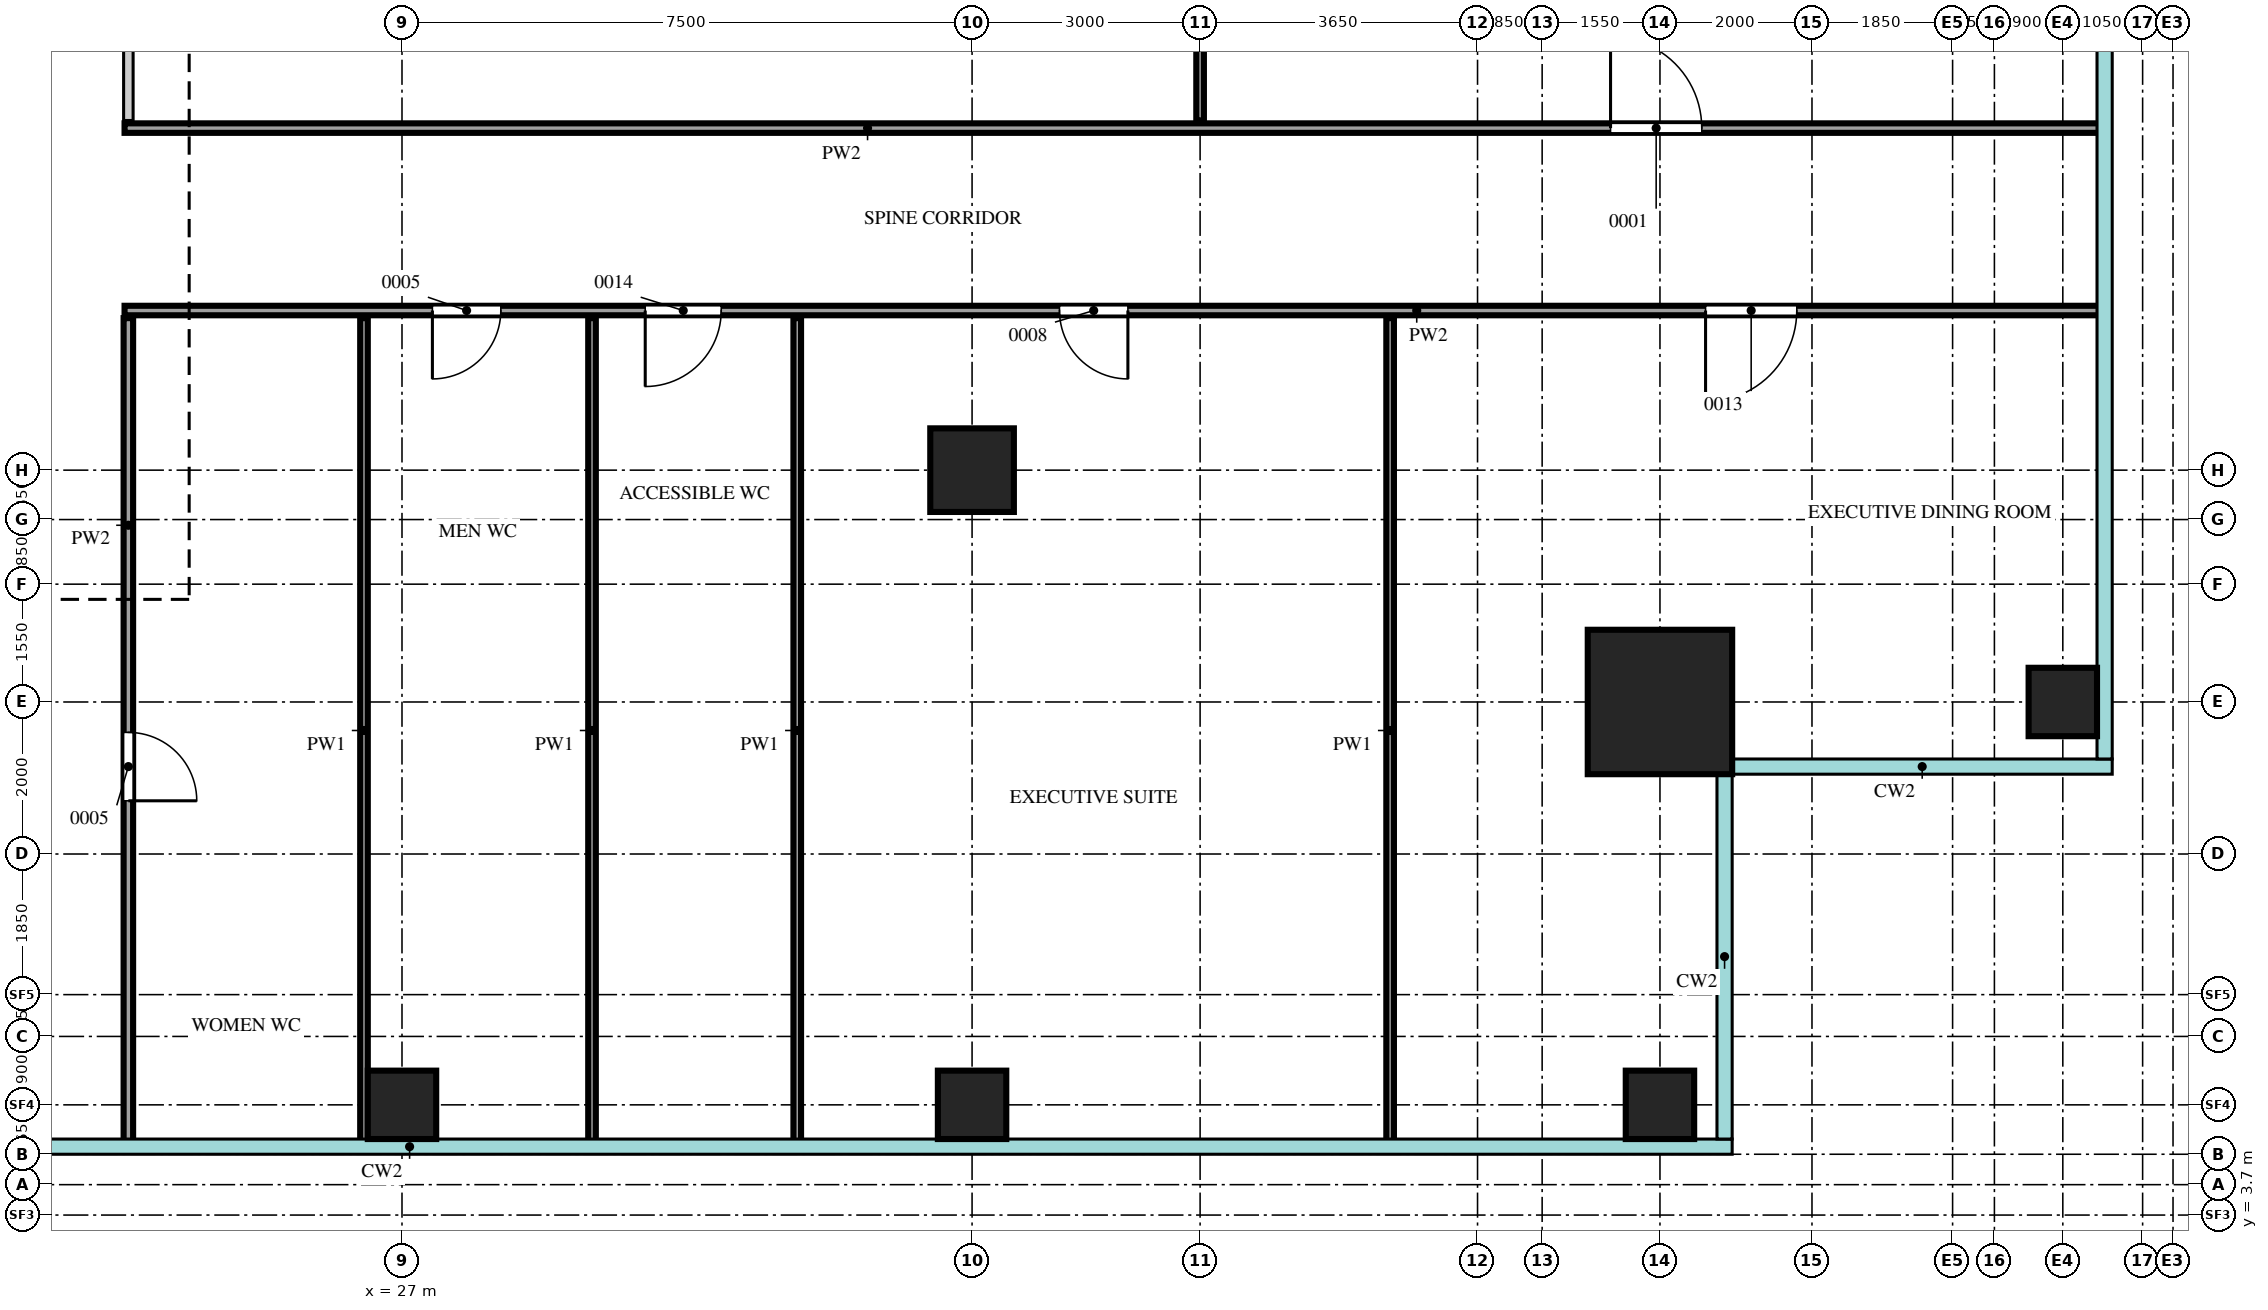
"""IFC4 building model, lengths in metres.
Left out: names, types, materials, properties, quantities, classifications, styles, units other than length and angle.
Written with IfcOpenShell. Run it as: python <this file> out.ifc"""

import sys

from ifc_helpers import new_model, si_unit, direction, frame, frame_2d, origin, origin_2d, place, context, subcontext, project, spatial, rectangle, extrude, source, transform, mapped, element, fill, save


model = new_model("IFC4")
c1 = context("Model", 3, precision=1e-05, world=origin(), true_north=direction((0.0, 1.0)))
c2 = subcontext(c1, "Body", "Model", "MODEL_VIEW")
j1 = project(units=[si_unit("LENGTHUNIT", "METRE"), si_unit("PLANEANGLEUNIT", "RADIAN")], contexts=[c1])
p1 = place(None, origin())
s1 = spatial("IfcSite", under=j1, at=p1, CompositionType="ELEMENT")
p2 = place(p1, origin())
s2 = spatial("IfcBuilding", under=s1, at=p2, CompositionType="ELEMENT")
p3 = place(p2, frame((0.0, 0.0, 270.2)))
s3 = spatial("IfcBuildingStorey", under=s2, at=p3, CompositionType="ELEMENT", Elevation=270.2)
m1 = source(origin(), c2, "Body", "SweptSolid", [
    extrude(rectangle(XDim=1.9, YDim=1.9, at=origin_2d()), origin(), (0.0, 0.0, 1.0), 4.0),
])
p4 = place(p3, frame((43.55, 10.45, 0.0), z_axis=(0.0, 0.0, 1.0), x_axis=(1.0, 0.0, 0.0)))
e1 = element("IfcColumn", 1, at=p4, inside=s3, PredefinedType="COLUMN", context=c2, shape_type="MappedRepresentation", body=[
    mapped(m1, transform((0.0, 0.0, 0.0))),
])
m2 = source(origin(), c2, "Body", "SweptSolid", [
    extrude(rectangle(XDim=0.9, YDim=0.9, at=origin_2d()), origin(), (0.0, 0.0, 1.0), 4.0),
])
for number, where, z_axis, x_axis in (
    (2, (27.0, 5.15, 0.0), (0.0, 0.0, 1.0), (1.0, 0.0, 0.0)),
    (3, (34.5, 5.15, 0.0), (0.0, 0.0, 1.0), (1.0, 0.0, 0.0)),
    (4, (43.55, 5.15, 0.0), (0.0, 0.0, 1.0), (1.0, 0.0, 0.0)),
    (5, (48.85, 10.45, 0.0), (0.0, 0.0, 1.0), (1.0, 0.0, 0.0)),
):
    element("IfcColumn", number, at=place(p3, frame(where, z_axis=z_axis, x_axis=x_axis)), inside=s3, PredefinedType="COLUMN", context=c2, shape_type="MappedRepresentation", body=[
        mapped(m2, transform((0.0, 0.0, 0.0))),
    ])
m3 = source(origin(), c2, "Body", "SweptSolid", [
    extrude(rectangle(XDim=1.1, YDim=1.1, at=origin_2d()), origin(), (0.0, 0.0, 1.0), 4.0),
])
p5 = place(p3, frame((34.5, 13.5, 0.0), z_axis=(0.0, 0.0, 1.0), x_axis=(1.0, 0.0, 0.0)))
e6 = element("IfcColumn", 6, at=p5, inside=s3, PredefinedType="COLUMN", context=c2, shape_type="MappedRepresentation", body=[
    mapped(m3, transform((0.0, 0.0, 0.0))),
])
m4 = source(origin(), c2, "Body", "SweptSolid", [
    extrude(rectangle(XDim=10.85, YDim=0.125, at=frame_2d((5.425, 0.0))), origin(), (0.0, 0.0, 1.0), 3.8),
])
p6 = place(p3, frame((23.4, 4.65, 0.0), z_axis=(0.0, 0.0, 1.0), x_axis=(0.0, 1.0, 0.0)))
e7 = element("IfcWall", 7, at=p6, inside=s3, PredefinedType="PARTITIONING", context=c2, shape_type="MappedRepresentation", body=[
    mapped(m4, transform((0.0, 0.0, 0.0))),
])
m5 = source(origin(), c2, "Body", "SweptSolid", [
    extrude(rectangle(XDim=0.9, YDim=2.1, at=frame_2d((0.45, 1.05))), frame((0.0, 0.073, 0.0), z_axis=(0.0, -1.0, 0.0), x_axis=(1.0, 0.0, 0.0)), (0.0, 0.0, 1.0), 0.145),
])
p7 = place(p6, frame((4.5, 0.0, 0.0)))
e8 = element("IfcOpeningElement", 8, at=p7, cuts=e7, PredefinedType="OPENING", context=c2, shape_type="MappedRepresentation", body=[
    mapped(m5, transform((0.0, 0.0, 0.0))),
])
m6 = source(origin(), c2, "Body", "SweptSolid", [
    extrude(rectangle(XDim=10.85, YDim=0.1, at=frame_2d((5.425, 0.0))), origin(), (0.0, 0.0, 1.0), 3.8),
])
for number, where, z_axis, x_axis in (
    (9, (26.5, 4.65, 0.0), (0.0, 0.0, 1.0), (0.0, 1.0, 0.0)),
    (10, (29.5, 4.65, 0.0), (0.0, 0.0, 1.0), (0.0, 1.0, 0.0)),
    (11, (32.2, 4.65, 0.0), (0.0, 0.0, 1.0), (0.0, 1.0, 0.0)),
    (12, (40.0, 4.65, 0.0), (0.0, 0.0, 1.0), (0.0, 1.0, 0.0)),
):
    element("IfcWall", number, at=place(p3, frame(where, z_axis=z_axis, x_axis=x_axis)), inside=s3, PredefinedType="PARTITIONING", context=c2, shape_type="MappedRepresentation", body=[
        mapped(m6, transform((0.0, 0.0, 0.0))),
    ])
m7 = source(origin(), c2, "Body", "SweptSolid", [
    extrude(rectangle(XDim=26.0, YDim=0.125, at=frame_2d((13.0, 0.0))), origin(), (0.0, 0.0, 1.0), 3.8),
])
p8 = place(p3, frame((23.35, 15.6, 0.0), z_axis=(0.0, 0.0, 1.0), x_axis=(1.0, 0.0, 0.0)))
e13 = element("IfcWall", 13, at=p8, inside=s3, PredefinedType="PARTITIONING", context=c2, shape_type="MappedRepresentation", body=[
    mapped(m7, transform((0.0, 0.0, 0.0))),
])
p9 = place(p8, frame((4.05, 0.0, 0.0)))
e14 = element("IfcOpeningElement", 14, at=p9, cuts=e13, PredefinedType="OPENING", context=c2, shape_type="MappedRepresentation", body=[
    mapped(m5, transform((0.0, 0.0, 0.0))),
])
m8 = source(origin(), c2, "Body", "SweptSolid", [
    extrude(rectangle(XDim=1.0, YDim=2.1, at=frame_2d((0.5, 1.05))), frame((0.0, 0.073, 0.0), z_axis=(0.0, -1.0, 0.0), x_axis=(1.0, 0.0, 0.0)), (0.0, 0.0, 1.0), 0.145),
])
p10 = place(p8, frame((6.85, 0.0, 0.0)))
e15 = element("IfcOpeningElement", 15, at=p10, cuts=e13, PredefinedType="OPENING", context=c2, shape_type="MappedRepresentation", body=[
    mapped(m8, transform((0.0, 0.0, 0.0))),
])
p11 = place(p8, frame((12.3, 0.0, 0.0)))
e16 = element("IfcOpeningElement", 16, at=p11, cuts=e13, PredefinedType="OPENING", context=c2, shape_type="MappedRepresentation", body=[
    mapped(m5, transform((0.0, 0.0, 0.0))),
])
m9 = source(origin(), c2, "Body", "SweptSolid", [
    extrude(rectangle(XDim=1.2, YDim=2.1, at=frame_2d((0.6, 1.05))), frame((0.0, 0.073, 0.0), z_axis=(0.0, -1.0, 0.0), x_axis=(1.0, 0.0, 0.0)), (0.0, 0.0, 1.0), 0.145),
])
p12 = place(p8, frame((20.8, 0.0, 0.0)))
e17 = element("IfcOpeningElement", 17, at=p12, cuts=e13, PredefinedType="OPENING", context=c2, shape_type="MappedRepresentation", body=[
    mapped(m9, transform((0.0, 0.0, 0.0))),
])
p13 = place(p3, frame((23.35, 18.0, 0.0), z_axis=(0.0, 0.0, 1.0), x_axis=(1.0, 0.0, 0.0)))
e18 = element("IfcWall", 18, at=p13, inside=s3, PredefinedType="PARTITIONING", context=c2, shape_type="MappedRepresentation", body=[
    mapped(m7, transform((0.0, 0.0, 0.0))),
])
p14 = place(p13, frame((19.55, 0.0, 0.0)))
e19 = element("IfcOpeningElement", 19, at=p14, cuts=e18, PredefinedType="OPENING", context=c2, shape_type="MappedRepresentation", body=[
    mapped(m9, transform((0.0, 0.0, 0.0))),
])
m10 = source(origin(), c2, "Body", "SweptSolid", [
    extrude(rectangle(XDim=18.4, YDim=0.125, at=frame_2d((9.2, 0.0))), origin(), (0.0, 0.0, 1.0), 3.8),
])
p15 = place(p3, frame((23.4, 18.1, 0.0), z_axis=(0.0, 0.0, 1.0), x_axis=(0.0, 1.0, 0.0)))
e20 = element("IfcWall", 20, at=p15, inside=s3, PredefinedType="PARTITIONING", context=c2, shape_type="MappedRepresentation", body=[
    mapped(m10, transform((0.0, 0.0, 0.0))),
])
p16 = place(p15, frame((8.6, 0.0, 0.0)))
e21 = element("IfcOpeningElement", 21, at=p16, cuts=e20, PredefinedType="OPENING", context=c2, shape_type="MappedRepresentation", body=[
    mapped(m9, transform((0.0, 0.0, 0.0))),
])
m11 = source(origin(), c2, "Body", "SweptSolid", [
    extrude(rectangle(XDim=18.4, YDim=0.1, at=frame_2d((9.2, 0.0))), origin(), (0.0, 0.0, 1.0), 3.8),
])
p17 = place(p3, frame((37.5, 18.1, 0.0), z_axis=(0.0, 0.0, 1.0), x_axis=(0.0, 1.0, 0.0)))
e22 = element("IfcWall", 22, at=p17, inside=s3, PredefinedType="PARTITIONING", context=c2, shape_type="MappedRepresentation", body=[
    mapped(m11, transform((0.0, 0.0, 0.0))),
])
m12 = source(origin(), c2, "Body", "SweptSolid", [
    extrude(rectangle(XDim=0.9, YDim=2.1, at=frame_2d((0.45, 1.05))), frame((0.0, 0.025, 0.0), z_axis=(0.0, -1.0, 0.0), x_axis=(1.0, 0.0, 0.0)), (0.0, 0.0, 1.0), 0.05),
])
p18 = place(p7, origin())
e23 = element("IfcDoor", 23, at=p18, inside=s3, OperationType="SINGLE_SWING_LEFT", PredefinedType="DOOR", context=c2, shape_type="MappedRepresentation", body=[
    mapped(m12, transform((0.0, 0.0, 0.0))),
])
fill(e8, e23)
p19 = place(p9, origin())
e24 = element("IfcDoor", 24, at=p19, inside=s3, OperationType="SINGLE_SWING_LEFT", PredefinedType="DOOR", context=c2, shape_type="MappedRepresentation", body=[
    mapped(m12, transform((0.0, 0.0, 0.0))),
])
fill(e14, e24)
m13 = source(origin(), c2, "Body", "SweptSolid", [
    extrude(rectangle(XDim=1.0, YDim=2.1, at=frame_2d((0.5, 1.05))), frame((0.0, 0.025, 0.0), z_axis=(0.0, -1.0, 0.0), x_axis=(1.0, 0.0, 0.0)), (0.0, 0.0, 1.0), 0.05),
])
p20 = place(p10, origin())
e25 = element("IfcDoor", 25, at=p20, inside=s3, OperationType="SINGLE_SWING_LEFT", PredefinedType="DOOR", context=c2, shape_type="MappedRepresentation", body=[
    mapped(m13, transform((0.0, 0.0, 0.0))),
])
fill(e15, e25)
p21 = place(p11, origin())
e26 = element("IfcDoor", 26, at=p21, inside=s3, OperationType="SINGLE_SWING_RIGHT", PredefinedType="DOOR", context=c2, shape_type="MappedRepresentation", body=[
    mapped(m12, transform((0.0, 0.0, 0.0))),
])
fill(e16, e26)
m14 = source(origin(), c2, "Body", "SweptSolid", [
    extrude(rectangle(XDim=1.2, YDim=2.1, at=frame_2d((0.6, 1.05))), frame((0.0, 0.025, 0.0), z_axis=(0.0, -1.0, 0.0), x_axis=(1.0, 0.0, 0.0)), (0.0, 0.0, 1.0), 0.05),
])
p22 = place(p12, origin())
e27 = element("IfcDoor", 27, at=p22, inside=s3, OperationType="SINGLE_SWING_LEFT", PredefinedType="DOOR", context=c2, shape_type="MappedRepresentation", body=[
    mapped(m14, transform((0.0, 0.0, 0.0))),
])
fill(e17, e27)
p23 = place(p14, origin())
e28 = element("IfcDoor", 28, at=p23, inside=s3, OperationType="SINGLE_SWING_RIGHT", PredefinedType="DOOR", context=c2, shape_type="MappedRepresentation", body=[
    mapped(m14, transform((0.0, 0.0, 0.0))),
])
fill(e19, e28)
save(model, sys.argv[1])
